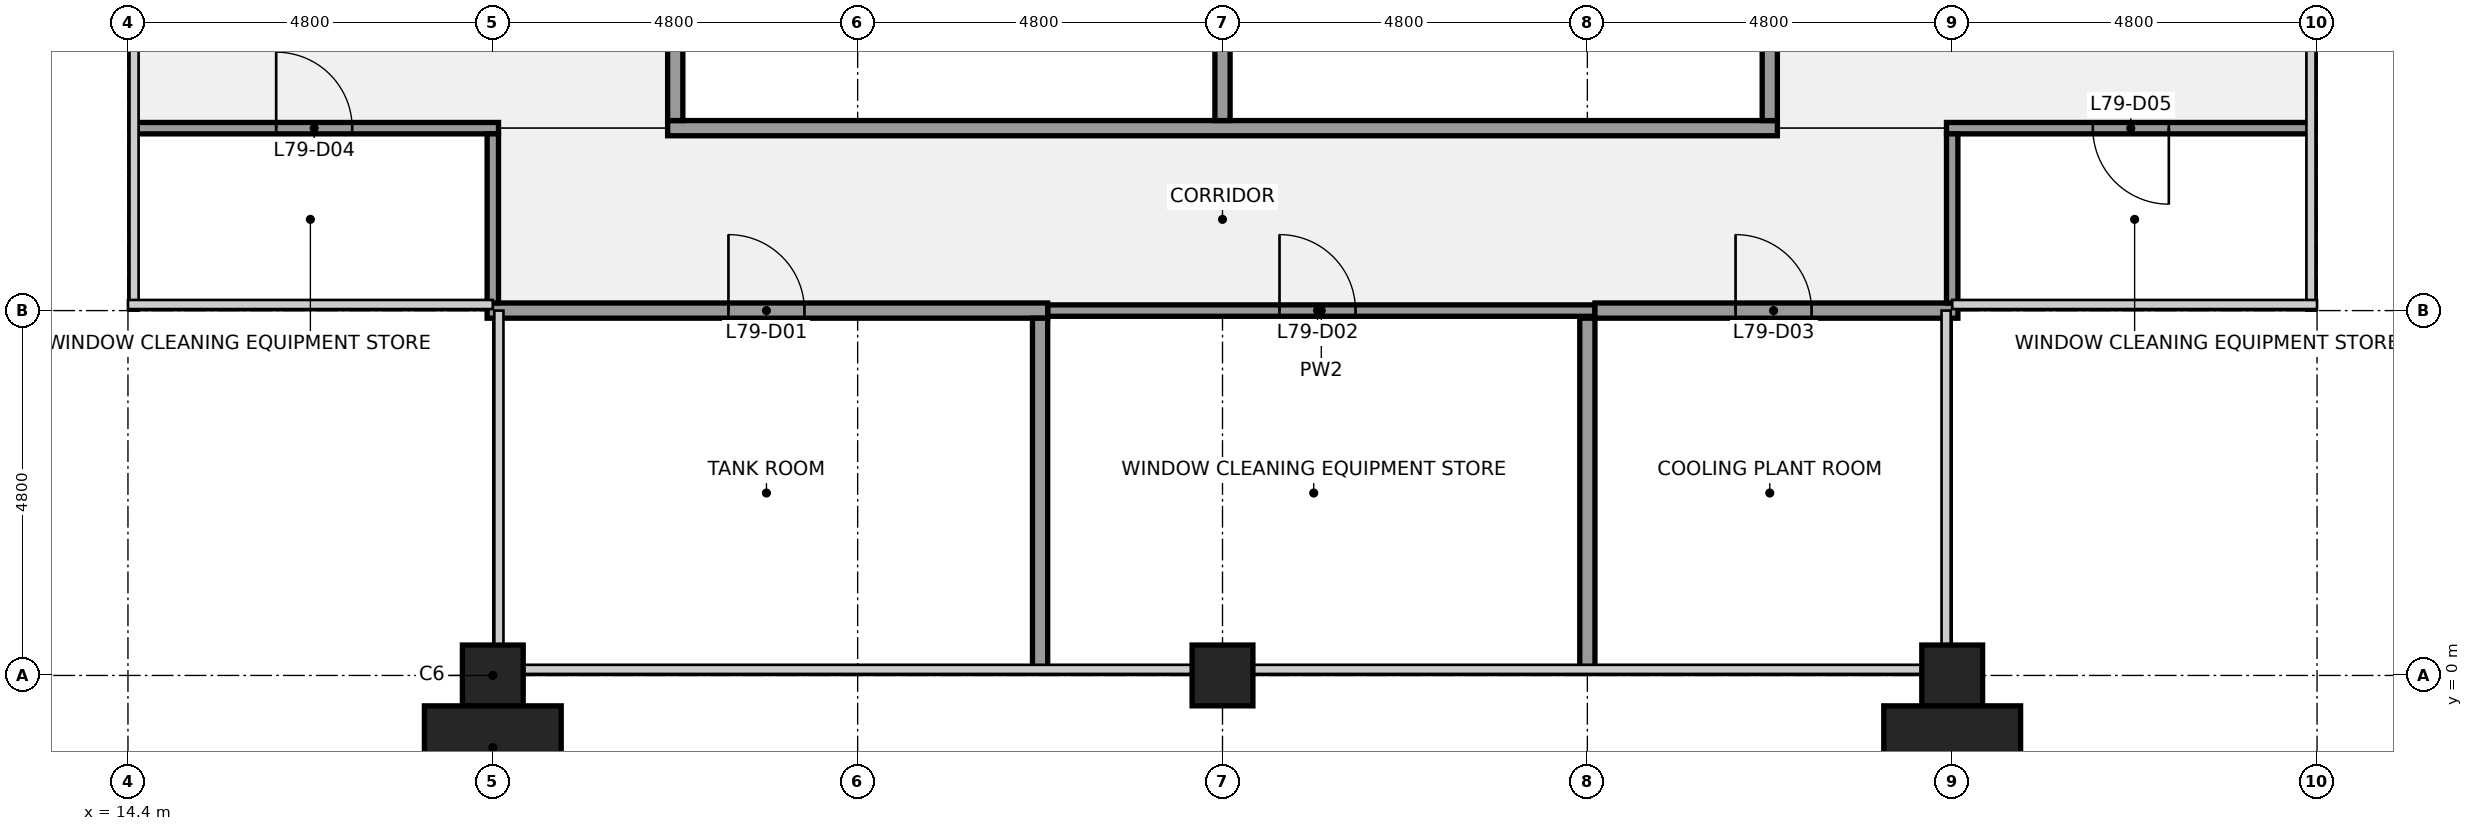
"""IFC4 building model, lengths in metres.
Left out: names, types, materials, properties, quantities, classifications, styles, units other than length and angle.
Written with IfcOpenShell. Run it as: python <this file> out.ifc"""

import sys

from ifc_helpers import new_model, si_unit, direction, frame, frame_2d, origin, origin_2d, place, context, subcontext, project, spatial, rectangle, extrude, element, fill, save


model = new_model("IFC4")
c1 = context("Model", 3, precision=1e-05, world=origin(), true_north=direction((0.0, 1.0)))
c2 = subcontext(c1, "Body", "Model", "MODEL_VIEW")
j1 = project(units=[si_unit("LENGTHUNIT", "METRE"), si_unit("PLANEANGLEUNIT", "RADIAN")], contexts=[c1])
p1 = place(None, origin())
s1 = spatial("IfcSite", under=j1, at=p1, CompositionType="ELEMENT")
p2 = place(p1, origin())
s2 = spatial("IfcBuilding", under=s1, at=p2, CompositionType="ELEMENT")
p3 = place(p2, frame((0.0, 0.0, 354.3)))
s3 = spatial("IfcBuildingStorey", under=s2, at=p3, CompositionType="ELEMENT", Elevation=354.3)
for number, where, z_axis, x_axis in (
    (1, (19.2, 0.0, 0.0), (0.0, 0.0, 1.0), (1.0, 0.0, 0.0)),
    (2, (28.8, 0.0, 0.0), (0.0, 0.0, 1.0), (1.0, 0.0, 0.0)),
    (3, (38.4, 0.0, 0.0), (0.0, 0.0, 1.0), (1.0, 0.0, 0.0)),
):
    element("IfcColumn", number, at=place(p3, frame(where, z_axis=z_axis, x_axis=x_axis)), inside=s3, PredefinedType="COLUMN", context=c2, shape_type="SweptSolid", body=[
        extrude(rectangle(XDim=0.8, YDim=0.8, at=origin_2d()), origin(), (0.0, 0.0, 1.0), 4.0),
    ])
p4 = place(p3, frame((26.5, 4.8, 0.0), z_axis=(0.0, 0.0, 1.0), x_axis=(1.0, 0.0, 0.0)))
e4 = element("IfcWall", 4, at=p4, inside=s3, PredefinedType="PARTITIONING", context=c2, shape_type="SweptSolid", body=[
    extrude(rectangle(XDim=7.2, YDim=0.15, at=frame_2d((3.6, 0.0))), origin(), (0.0, 0.0, 1.0), 2.759),
])
p5 = place(p4, frame((3.05, 0.0, 0.0)))
e5 = element("IfcOpeningElement", 5, at=p5, cuts=e4, PredefinedType="OPENING", context=c2, shape_type="SweptSolid", body=[
    extrude(rectangle(XDim=1.0, YDim=2.1, at=frame_2d((0.5, 1.05))), frame((0.0, 0.085, 0.0), z_axis=(0.0, -1.0, 0.0), x_axis=(1.0, 0.0, 0.0)), (0.0, 0.0, 1.0), 0.17),
])
p6 = place(p3, frame((19.125, 4.8, 0.0), z_axis=(0.0, 0.0, 1.0), x_axis=(1.0, 0.0, 0.0)))
e6 = element("IfcWall", 6, at=p6, inside=s3, PredefinedType="PARTITIONING", context=c2, shape_type="SweptSolid", body=[
    extrude(rectangle(XDim=7.375, YDim=0.2, at=frame_2d((3.688, 0.0))), origin(), (0.0, 0.0, 1.0), 2.759),
])
p7 = place(p6, frame((3.175, 0.0, 0.0)))
e7 = element("IfcOpeningElement", 7, at=p7, cuts=e6, PredefinedType="OPENING", context=c2, shape_type="SweptSolid", body=[
    extrude(rectangle(XDim=1.0, YDim=2.1, at=frame_2d((0.5, 1.05))), frame((0.0, 0.11, 0.0), z_axis=(0.0, -1.0, 0.0), x_axis=(1.0, 0.0, 0.0)), (0.0, 0.0, 1.0), 0.22),
])
p8 = place(p3, frame((33.7, 4.8, 0.0), z_axis=(0.0, 0.0, 1.0), x_axis=(1.0, 0.0, 0.0)))
e8 = element("IfcWall", 8, at=p8, inside=s3, PredefinedType="PARTITIONING", context=c2, shape_type="SweptSolid", body=[
    extrude(rectangle(XDim=4.775, YDim=0.2, at=frame_2d((2.388, 0.0))), origin(), (0.0, 0.0, 1.0), 2.759),
])
p9 = place(p8, frame((1.85, 0.0, 0.0)))
e9 = element("IfcOpeningElement", 9, at=p9, cuts=e8, PredefinedType="OPENING", context=c2, shape_type="SweptSolid", body=[
    extrude(rectangle(XDim=1.0, YDim=2.1, at=frame_2d((0.5, 1.05))), frame((0.0, 0.11, 0.0), z_axis=(0.0, -1.0, 0.0), x_axis=(1.0, 0.0, 0.0)), (0.0, 0.0, 1.0), 0.22),
])
p10 = place(p3, frame((14.5, 7.2, 0.0), z_axis=(0.0, 0.0, 1.0), x_axis=(1.0, 0.0, 0.0)))
e10 = element("IfcWall", 10, at=p10, inside=s3, PredefinedType="PARTITIONING", context=c2, shape_type="SweptSolid", body=[
    extrude(rectangle(XDim=4.775, YDim=0.15, at=frame_2d((2.387, 0.0))), origin(), (0.0, 0.0, 1.0), 2.759),
])
p11 = place(p10, frame((1.85, 0.0, 0.0)))
e11 = element("IfcOpeningElement", 11, at=p11, cuts=e10, PredefinedType="OPENING", context=c2, shape_type="SweptSolid", body=[
    extrude(rectangle(XDim=1.0, YDim=2.1, at=frame_2d((0.5, 1.05))), frame((0.0, 0.085, 0.0), z_axis=(0.0, -1.0, 0.0), x_axis=(1.0, 0.0, 0.0)), (0.0, 0.0, 1.0), 0.17),
])
p12 = place(p3, frame((38.325, 7.2, 0.0), z_axis=(0.0, 0.0, 1.0), x_axis=(1.0, 0.0, 0.0)))
e12 = element("IfcWall", 12, at=p12, inside=s3, PredefinedType="PARTITIONING", context=c2, shape_type="SweptSolid", body=[
    extrude(rectangle(XDim=4.775, YDim=0.15, at=frame_2d((2.388, 0.0))), origin(), (0.0, 0.0, 1.0), 2.759),
])
p13 = place(p12, frame((1.925, 0.0, 0.0)))
e13 = element("IfcOpeningElement", 13, at=p13, cuts=e12, PredefinedType="OPENING", context=c2, shape_type="SweptSolid", body=[
    extrude(rectangle(XDim=1.0, YDim=2.1, at=frame_2d((0.5, 1.05))), frame((0.0, 0.085, 0.0), z_axis=(0.0, -1.0, 0.0), x_axis=(1.0, 0.0, 0.0)), (0.0, 0.0, 1.0), 0.17),
])
p14 = place(p3, frame((21.5, 7.2, 0.0), z_axis=(0.0, 0.0, 1.0), x_axis=(1.0, 0.0, 0.0)))
e14 = element("IfcWall", 14, at=p14, inside=s3, PredefinedType="PARTITIONING", context=c2, shape_type="SweptSolid", body=[
    extrude(rectangle(XDim=14.6, YDim=0.2, at=frame_2d((7.3, 0.0))), origin(), (0.0, 0.0, 1.0), 2.759),
])
p15 = place(p3, frame((19.2, 4.9, 0.0), z_axis=(0.0, 0.0, 1.0), x_axis=(0.0, 1.0, 0.0)))
e15 = element("IfcWall", 15, at=p15, inside=s3, PredefinedType="PARTITIONING", context=c2, shape_type="SweptSolid", body=[
    extrude(rectangle(XDim=2.225, YDim=0.15, at=frame_2d((1.113, 0.0))), origin(), (0.0, 0.0, 1.0), 2.759),
])
p16 = place(p3, frame((21.6, 7.3, 0.0), z_axis=(0.0, 0.0, 1.0), x_axis=(0.0, 1.0, 0.0)))
e16 = element("IfcWall", 16, at=p16, inside=s3, PredefinedType="PARTITIONING", context=c2, shape_type="SweptSolid", body=[
    extrude(rectangle(XDim=7.0, YDim=0.2, at=frame_2d((3.5, 0.0))), origin(), (0.0, 0.0, 1.0), 2.759),
])
p17 = place(p16, frame((3.0, 0.0, 0.0)))
e17 = element("IfcOpeningElement", 17, at=p17, cuts=e16, PredefinedType="OPENING", context=c2, shape_type="SweptSolid", body=[
    extrude(rectangle(XDim=1.0, YDim=2.1, at=frame_2d((0.5, 1.05))), frame((0.0, 0.11, 0.0), z_axis=(0.0, -1.0, 0.0), x_axis=(1.0, 0.0, 0.0)), (0.0, 0.0, 1.0), 0.22),
])
p18 = place(p3, frame((26.4, 0.1, 0.0), z_axis=(0.0, 0.0, 1.0), x_axis=(0.0, 1.0, 0.0)))
e18 = element("IfcWall", 18, at=p18, inside=s3, PredefinedType="PARTITIONING", context=c2, shape_type="SweptSolid", body=[
    extrude(rectangle(XDim=4.6, YDim=0.2, at=frame_2d((2.3, 0.0))), origin(), (0.0, 0.0, 1.0), 2.759),
])
p19 = place(p3, frame((28.8, 7.3, 0.0), z_axis=(0.0, 0.0, 1.0), x_axis=(0.0, 1.0, 0.0)))
e19 = element("IfcWall", 19, at=p19, inside=s3, PredefinedType="PARTITIONING", context=c2, shape_type="SweptSolid", body=[
    extrude(rectangle(XDim=7.0, YDim=0.2, at=frame_2d((3.5, 0.0))), origin(), (0.0, 0.0, 1.0), 2.759),
])
p20 = place(p3, frame((33.6, 0.1, 0.0), z_axis=(0.0, 0.0, 1.0), x_axis=(0.0, 1.0, 0.0)))
e20 = element("IfcWall", 20, at=p20, inside=s3, PredefinedType="PARTITIONING", context=c2, shape_type="SweptSolid", body=[
    extrude(rectangle(XDim=4.6, YDim=0.2, at=frame_2d((2.3, 0.0))), origin(), (0.0, 0.0, 1.0), 2.759),
])
p21 = place(p3, frame((36.0, 7.3, 0.0), z_axis=(0.0, 0.0, 1.0), x_axis=(0.0, 1.0, 0.0)))
e21 = element("IfcWall", 21, at=p21, inside=s3, PredefinedType="PARTITIONING", context=c2, shape_type="SweptSolid", body=[
    extrude(rectangle(XDim=7.0, YDim=0.2, at=frame_2d((3.5, 0.0))), origin(), (0.0, 0.0, 1.0), 2.759),
])
p22 = place(p21, frame((3.0, 0.0, 0.0)))
e22 = element("IfcOpeningElement", 22, at=p22, cuts=e21, PredefinedType="OPENING", context=c2, shape_type="SweptSolid", body=[
    extrude(rectangle(XDim=1.0, YDim=2.1, at=frame_2d((0.5, 1.05))), frame((0.0, 0.11, 0.0), z_axis=(0.0, -1.0, 0.0), x_axis=(1.0, 0.0, 0.0)), (0.0, 0.0, 1.0), 0.22),
])
p23 = place(p3, frame((38.4, 4.9, 0.0), z_axis=(0.0, 0.0, 1.0), x_axis=(0.0, 1.0, 0.0)))
e23 = element("IfcWall", 23, at=p23, inside=s3, PredefinedType="PARTITIONING", context=c2, shape_type="SweptSolid", body=[
    extrude(rectangle(XDim=2.225, YDim=0.15, at=frame_2d((1.113, 0.0))), origin(), (0.0, 0.0, 1.0), 2.759),
])
for number, where, z_axis, x_axis in (
    (24, (19.2, -0.95, 0.0), (0.0, 0.0, 1.0), (1.0, 0.0, 0.0)),
    (25, (38.4, -0.95, 0.0), (0.0, 0.0, 1.0), (1.0, 0.0, 0.0)),
):
    element("IfcColumn", number, at=place(p3, frame(where, z_axis=z_axis, x_axis=x_axis)), inside=s3, PredefinedType="PILASTER", context=c2, shape_type="SweptSolid", body=[
        extrude(rectangle(XDim=1.8, YDim=1.1, at=origin_2d()), origin(), (0.0, 0.0, 1.0), 4.0),
    ])
p24 = place(p7, origin())
e26 = element("IfcDoor", 26, at=p24, inside=s3, OperationType="SINGLE_SWING_LEFT", PredefinedType="DOOR", context=c2, shape_type="SweptSolid", body=[
    extrude(rectangle(XDim=1.0, YDim=2.1, at=frame_2d((0.5, 1.05))), frame((0.0, 0.025, 0.0), z_axis=(0.0, -1.0, 0.0), x_axis=(1.0, 0.0, 0.0)), (0.0, 0.0, 1.0), 0.05),
])
fill(e7, e26)
p25 = place(p5, origin())
e27 = element("IfcDoor", 27, at=p25, inside=s3, OperationType="SINGLE_SWING_LEFT", PredefinedType="DOOR", context=c2, shape_type="SweptSolid", body=[
    extrude(rectangle(XDim=1.0, YDim=2.1, at=frame_2d((0.5, 1.05))), frame((0.0, 0.025, 0.0), z_axis=(0.0, -1.0, 0.0), x_axis=(1.0, 0.0, 0.0)), (0.0, 0.0, 1.0), 0.05),
])
fill(e5, e27)
p26 = place(p9, origin())
e28 = element("IfcDoor", 28, at=p26, inside=s3, OperationType="SINGLE_SWING_LEFT", PredefinedType="DOOR", context=c2, shape_type="SweptSolid", body=[
    extrude(rectangle(XDim=1.0, YDim=2.1, at=frame_2d((0.5, 1.05))), frame((0.0, 0.025, 0.0), z_axis=(0.0, -1.0, 0.0), x_axis=(1.0, 0.0, 0.0)), (0.0, 0.0, 1.0), 0.05),
])
fill(e9, e28)
p27 = place(p11, origin())
e29 = element("IfcDoor", 29, at=p27, inside=s3, OperationType="SINGLE_SWING_LEFT", PredefinedType="DOOR", context=c2, shape_type="SweptSolid", body=[
    extrude(rectangle(XDim=1.0, YDim=2.1, at=frame_2d((0.5, 1.05))), frame((0.0, 0.025, 0.0), z_axis=(0.0, -1.0, 0.0), x_axis=(1.0, 0.0, 0.0)), (0.0, 0.0, 1.0), 0.05),
])
fill(e11, e29)
p28 = place(p13, origin())
e30 = element("IfcDoor", 30, at=p28, inside=s3, OperationType="SINGLE_SWING_RIGHT", PredefinedType="DOOR", context=c2, shape_type="SweptSolid", body=[
    extrude(rectangle(XDim=1.0, YDim=2.1, at=frame_2d((0.5, 1.05))), frame((0.0, 0.025, 0.0), z_axis=(0.0, -1.0, 0.0), x_axis=(1.0, 0.0, 0.0)), (0.0, 0.0, 1.0), 0.05),
])
fill(e13, e30)
save(model, sys.argv[1])
